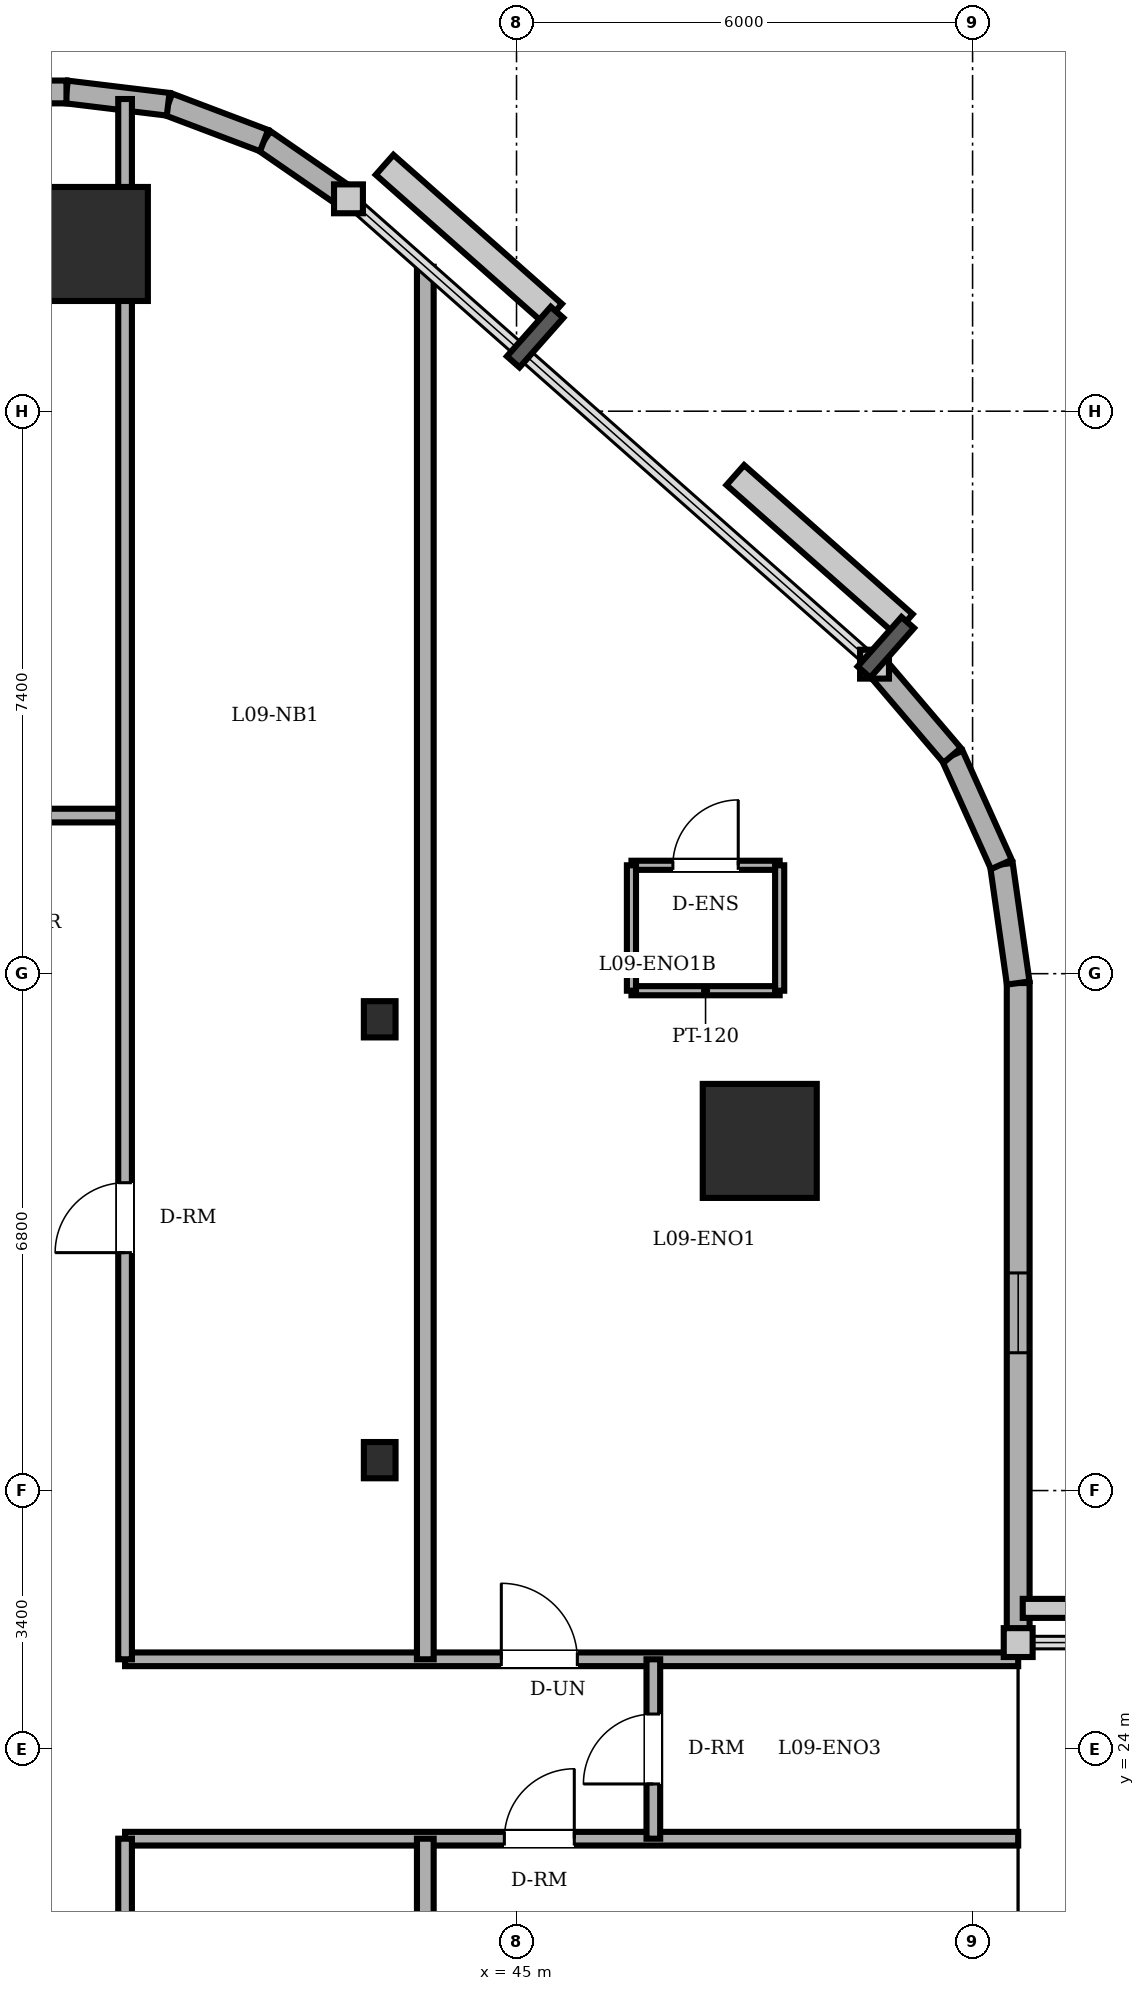
"""IFC4 building model, lengths in metres.
Left out: names, types, materials, properties, quantities, classifications, styles, units other than length and angle.
Written with IfcOpenShell. Run it as: python <this file> out.ifc"""

import sys

from ifc_helpers import new_model, si_unit, direction, frame, frame_2d, origin, origin_2d, place, context, subcontext, project, spatial, rectangle, circle, i_section, extrude, element, fill, save


model = new_model("IFC4")
c1 = context("Model", 3, precision=1e-05, world=origin(), true_north=direction((0.0, 1.0)))
c2 = subcontext(c1, "Body", "Model", "MODEL_VIEW")
j1 = project(units=[si_unit("LENGTHUNIT", "METRE"), si_unit("PLANEANGLEUNIT", "RADIAN")], contexts=[c1])
p1 = place(None, origin())
s1 = spatial("IfcSite", under=j1, at=p1, CompositionType="ELEMENT")
p2 = place(p1, origin())
s2 = spatial("IfcBuilding", under=s1, at=p2, CompositionType="ELEMENT")
p3 = place(p2, frame((0.0, 0.0, 36.0)))
s3 = spatial("IfcBuildingStorey", under=s2, at=p3, CompositionType="ELEMENT", Elevation=36.0)
for number, where, z_axis, x_axis in (
    (1, (48.2, 32.0, 0.0), (0.0, 0.0, 1.0), (1.0, 0.0, 0.0)),
    (2, (39.4, 43.8, 0.0), (0.0, 0.0, 1.0), (1.0, 0.0, 0.0)),
):
    element("IfcColumn", number, at=place(p3, frame(where, z_axis=z_axis, x_axis=x_axis)), inside=s3, PredefinedType="COLUMN", context=c2, shape_type="SweptSolid", body=[
        extrude(circle(Radius=0.75, at=origin_2d()), origin(), (0.0, 0.0, 1.0), 3.6),
    ])
for number, where, z_axis, x_axis in (
    (3, (43.2, 27.8, 0.0), (0.0, 0.0, 1.0), (1.0, 0.0, 0.0)),
    (4, (43.2, 33.6, 0.0), (0.0, 0.0, 1.0), (1.0, 0.0, 0.0)),
):
    element("IfcColumn", number, at=place(p3, frame(where, z_axis=z_axis, x_axis=x_axis)), inside=s3, PredefinedType="COLUMN", context=c2, shape_type="SweptSolid", body=[
        extrude(i_section(OverallWidth=0.417, OverallDepth=0.477, WebThickness=0.036, FlangeThickness=0.057, FilletRadius=0.015, at=origin_2d()), origin(), (0.0, 0.0, 1.0), 3.6),
    ])
p4 = place(p3, frame((51.6, 25.4, 0.0), z_axis=(0.0, 0.0, 1.0), x_axis=(0.0, 1.0, 0.0)))
e5 = element("IfcWall", 5, at=p4, inside=s3, PredefinedType="SOLIDWALL", context=c2, shape_type="SweptSolid", body=[
    extrude(rectangle(XDim=8.677, YDim=0.3, at=frame_2d((4.338, 0.0))), origin(), (0.0, 0.0, 1.0), 3.4),
])
p5 = place(p4, frame((3.813, 0.0, 0.85)))
e6 = element("IfcOpeningElement", 6, at=p5, cuts=e5, PredefinedType="OPENING", context=c2, shape_type="SweptSolid", body=[
    extrude(rectangle(XDim=1.05, YDim=1.55, at=frame_2d((0.525, 0.775))), frame((0.0, 0.16, 0.0), z_axis=(0.0, -1.0, 0.0), x_axis=(1.0, 0.0, 0.0)), (0.0, 0.0, 1.0), 0.32),
])
p6 = place(p3, frame((51.6, 34.077, 0.0), z_axis=(0.0, 0.0, 1.0), x_axis=(-0.140380048512, 0.990097693149, 0.0)))
e7 = element("IfcWall", 7, at=p6, inside=s3, PredefinedType="SOLIDWALL", context=c2, shape_type="SweptSolid", body=[
    extrude(rectangle(XDim=1.576, YDim=0.3, at=frame_2d((0.788, 0.0))), origin(), (0.0, 0.0, 1.0), 3.4),
])
p7 = place(p3, frame((51.379, 35.637, 0.0), z_axis=(0.0, 0.0, 1.0), x_axis=(-0.410996558744, 0.911636895206, 0.0)))
e8 = element("IfcWall", 8, at=p7, inside=s3, PredefinedType="SOLIDWALL", context=c2, shape_type="SweptSolid", body=[
    extrude(rectangle(XDim=1.574, YDim=0.3, at=frame_2d((0.787, 0.0))), origin(), (0.0, 0.0, 1.0), 3.4),
])
p8 = place(p3, frame((50.732, 37.072, 0.0), z_axis=(0.0, 0.0, 1.0), x_axis=(-0.648389989909, 0.7613083613, 0.0)))
e9 = element("IfcWall", 9, at=p8, inside=s3, PredefinedType="SOLIDWALL", context=c2, shape_type="SweptSolid", body=[
    extrude(rectangle(XDim=1.576, YDim=0.3, at=frame_2d((0.788, 0.0))), origin(), (0.0, 0.0, 1.0), 3.4),
])
p9 = place(p3, frame((42.789, 44.394, 0.0), z_axis=(0.0, 0.0, 1.0), x_axis=(-0.823116500192, 0.567872544777, 0.0)))
e10 = element("IfcWall", 10, at=p9, inside=s3, PredefinedType="SOLIDWALL", context=c2, shape_type="SweptSolid", body=[
    extrude(rectangle(XDim=1.349, YDim=0.3, at=frame_2d((0.674, 0.0))), origin(), (0.0, 0.0, 1.0), 3.4),
])
p10 = place(p3, frame((41.679, 45.16, 0.0), z_axis=(0.0, 0.0, 1.0), x_axis=(-0.935156721165, 0.354234254216, 0.0)))
e11 = element("IfcWall", 11, at=p10, inside=s3, PredefinedType="SOLIDWALL", context=c2, shape_type="SweptSolid", body=[
    extrude(rectangle(XDim=1.349, YDim=0.3, at=frame_2d((0.675, 0.0))), origin(), (0.0, 0.0, 1.0), 3.4),
])
p11 = place(p3, frame((40.417, 45.638, 0.0), z_axis=(0.0, 0.0, 1.0), x_axis=(-0.992739027259, 0.120288086515, 0.0)))
e12 = element("IfcWall", 12, at=p11, inside=s3, PredefinedType="SOLIDWALL", context=c2, shape_type="SweptSolid", body=[
    extrude(rectangle(XDim=1.348, YDim=0.3, at=frame_2d((0.674, 0.0))), origin(), (0.0, 0.0, 1.0), 3.4),
])
p12 = place(p3, frame((39.079, 45.8, 0.0), z_axis=(0.0, 0.0, 1.0), x_axis=(-1.0, 0.0, 0.0)))
e13 = element("IfcWall", 13, at=p12, inside=s3, PredefinedType="SOLIDWALL", context=c2, shape_type="SweptSolid", body=[
    extrude(rectangle(XDim=30.079, YDim=0.3, at=frame_2d((15.04, 0.0))), origin(), (0.0, 0.0, 1.0), 3.4),
])
p13 = place(p12, frame((16.504, 0.0, 0.0)))
e14 = element("IfcOpeningElement", 14, at=p13, cuts=e13, PredefinedType="OPENING", context=c2, shape_type="SweptSolid", body=[
    extrude(rectangle(XDim=0.95, YDim=2.2, at=frame_2d((0.475, 1.1))), frame((0.0, 0.16, 0.0), z_axis=(0.0, -1.0, 0.0), x_axis=(1.0, 0.0, 0.0)), (0.0, 0.0, 1.0), 0.32),
])
p14 = place(p12, frame((2.226, 0.0, 0.85)))
e15 = element("IfcOpeningElement", 15, at=p14, cuts=e13, PredefinedType="OPENING", context=c2, shape_type="SweptSolid", body=[
    extrude(rectangle(XDim=1.8, YDim=1.55, at=frame_2d((0.9, 0.775))), frame((0.0, 0.16, 0.0), z_axis=(0.0, -1.0, 0.0), x_axis=(1.0, 0.0, 0.0)), (0.0, 0.0, 1.0), 0.32),
])
p15 = place(p12, frame((5.003, 0.0, 0.85)))
e16 = element("IfcOpeningElement", 16, at=p15, cuts=e13, PredefinedType="OPENING", context=c2, shape_type="SweptSolid", body=[
    extrude(rectangle(XDim=1.8, YDim=1.55, at=frame_2d((0.9, 0.775))), frame((0.0, 0.16, 0.0), z_axis=(0.0, -1.0, 0.0), x_axis=(1.0, 0.0, 0.0)), (0.0, 0.0, 1.0), 0.32),
])
p16 = place(p12, frame((10.179, 0.0, 0.85)))
e17 = element("IfcOpeningElement", 17, at=p16, cuts=e13, PredefinedType="OPENING", context=c2, shape_type="SweptSolid", body=[
    extrude(rectangle(XDim=1.8, YDim=1.55, at=frame_2d((0.9, 0.775))), frame((0.0, 0.16, 0.0), z_axis=(0.0, -1.0, 0.0), x_axis=(1.0, 0.0, 0.0)), (0.0, 0.0, 1.0), 0.32),
])
p17 = place(p12, frame((12.579, 0.0, 0.85)))
e18 = element("IfcOpeningElement", 18, at=p17, cuts=e13, PredefinedType="OPENING", context=c2, shape_type="SweptSolid", body=[
    extrude(rectangle(XDim=1.8, YDim=1.55, at=frame_2d((0.9, 0.775))), frame((0.0, 0.16, 0.0), z_axis=(0.0, -1.0, 0.0), x_axis=(1.0, 0.0, 0.0)), (0.0, 0.0, 1.0), 0.32),
])
p18 = place(p12, frame((19.007, 0.0, 0.85)))
e19 = element("IfcOpeningElement", 19, at=p18, cuts=e13, PredefinedType="OPENING", context=c2, shape_type="SweptSolid", body=[
    extrude(rectangle(XDim=1.8, YDim=1.55, at=frame_2d((0.9, 0.775))), frame((0.0, 0.16, 0.0), z_axis=(0.0, -1.0, 0.0), x_axis=(1.0, 0.0, 0.0)), (0.0, 0.0, 1.0), 0.32),
])
p19 = place(p12, frame((23.034, 0.0, 0.85)))
e20 = element("IfcOpeningElement", 20, at=p19, cuts=e13, PredefinedType="OPENING", context=c2, shape_type="SweptSolid", body=[
    extrude(rectangle(XDim=1.8, YDim=1.55, at=frame_2d((0.9, 0.775))), frame((0.0, 0.16, 0.0), z_axis=(0.0, -1.0, 0.0), x_axis=(1.0, 0.0, 0.0)), (0.0, 0.0, 1.0), 0.32),
])
p20 = place(p3, frame((46.512, 35.626, 0.0), z_axis=(0.0, 0.0, 1.0), x_axis=(1.0, 0.0, 0.0)))
e21 = element("IfcWall", 21, at=p20, inside=s3, PredefinedType="PARTITIONING", context=c2, shape_type="SweptSolid", body=[
    extrude(rectangle(XDim=1.95, YDim=0.12, at=frame_2d((0.975, 0.0))), origin(), (0.0, 0.0, 1.0), 3.4),
])
p21 = place(p20, frame((0.545, 0.0, 0.0)))
e22 = element("IfcOpeningElement", 22, at=p21, cuts=e21, PredefinedType="OPENING", context=c2, shape_type="SweptSolid", body=[
    extrude(rectangle(XDim=0.86, YDim=2.1, at=frame_2d((0.43, 1.05))), frame((0.0, 0.07, 0.0), z_axis=(0.0, -1.0, 0.0), x_axis=(1.0, 0.0, 0.0)), (0.0, 0.0, 1.0), 0.14),
])
p22 = place(p3, frame((48.462, 33.976, 0.0), z_axis=(0.0, 0.0, 1.0), x_axis=(-1.0, 0.0, 0.0)))
e23 = element("IfcWall", 23, at=p22, inside=s3, PredefinedType="PARTITIONING", context=c2, shape_type="SweptSolid", body=[
    extrude(rectangle(XDim=1.95, YDim=0.12, at=frame_2d((0.975, 0.0))), origin(), (0.0, 0.0, 1.0), 3.4),
])
for number, where, z_axis, x_axis in (
    (24, (46.512, 35.626, 0.0), (0.0, 0.0, 1.0), (0.0, -1.0, 0.0)),
    (25, (48.462, 33.976, 0.0), (0.0, 0.0, 1.0), (0.0, 1.0, 0.0)),
):
    element("IfcWall", number, at=place(p3, frame(where, z_axis=z_axis, x_axis=x_axis)), inside=s3, PredefinedType="PARTITIONING", context=c2, shape_type="SweptSolid", body=[
        extrude(rectangle(XDim=1.65, YDim=0.12, at=frame_2d((0.825, 0.0))), origin(), (0.0, 0.0, 1.0), 3.4),
    ])
p23 = place(p3, frame((39.85, 22.82, 0.0), z_axis=(0.0, 0.0, 1.0), x_axis=(1.0, 0.0, 0.0)))
e26 = element("IfcWall", 26, at=p23, inside=s3, PredefinedType="PARTITIONING", context=c2, shape_type="SweptSolid", body=[
    extrude(rectangle(XDim=11.75, YDim=0.18, at=frame_2d((5.875, 0.0))), origin(), (0.0, 0.0, 1.0), 3.4),
])
p24 = place(p23, frame((4.99, 0.0, 0.0)))
e27 = element("IfcOpeningElement", 27, at=p24, cuts=e26, PredefinedType="OPENING", context=c2, shape_type="SweptSolid", body=[
    extrude(rectangle(XDim=0.92, YDim=2.1, at=frame_2d((0.46, 1.05))), frame((0.0, 0.1, 0.0), z_axis=(0.0, -1.0, 0.0), x_axis=(1.0, 0.0, 0.0)), (0.0, 0.0, 1.0), 0.2),
])
p25 = place(p3, frame((39.85, 25.18, 0.0), z_axis=(0.0, 0.0, 1.0), x_axis=(1.0, 0.0, 0.0)))
e28 = element("IfcWall", 28, at=p25, inside=s3, PredefinedType="PARTITIONING", context=c2, shape_type="SweptSolid", body=[
    extrude(rectangle(XDim=11.75, YDim=0.18, at=frame_2d((5.875, 0.0))), origin(), (0.0, 0.0, 1.0), 3.4),
])
p26 = place(p25, frame((4.95, 0.0, 0.0)))
e29 = element("IfcOpeningElement", 29, at=p26, cuts=e28, PredefinedType="OPENING", context=c2, shape_type="SweptSolid", body=[
    extrude(rectangle(XDim=1.0, YDim=2.15, at=frame_2d((0.5, 1.075))), frame((0.0, 0.1, 0.0), z_axis=(0.0, -1.0, 0.0), x_axis=(1.0, 0.0, 0.0)), (0.0, 0.0, 1.0), 0.2),
])
p27 = place(p3, frame((3.4, 36.28, 0.0), z_axis=(0.0, 0.0, 1.0), x_axis=(1.0, 0.0, 0.0)))
e30 = element("IfcWall", 30, at=p27, inside=s3, PredefinedType="PARTITIONING", context=c2, shape_type="SweptSolid", body=[
    extrude(rectangle(XDim=36.45, YDim=0.18, at=frame_2d((18.225, 0.0))), origin(), (0.0, 0.0, 1.0), 3.4),
])
p28 = place(p27, frame((21.05, 0.0, 0.0)))
e31 = element("IfcOpeningElement", 31, at=p28, cuts=e30, PredefinedType="OPENING", context=c2, shape_type="SweptSolid", body=[
    extrude(rectangle(XDim=0.9, YDim=2.1, at=frame_2d((0.45, 1.05))), frame((0.0, 0.1, 0.0), z_axis=(0.0, -1.0, 0.0), x_axis=(1.0, 0.0, 0.0)), (0.0, 0.0, 1.0), 0.2),
])
p29 = place(p27, frame((24.67, 0.0, 0.0)))
e32 = element("IfcOpeningElement", 32, at=p29, cuts=e30, PredefinedType="OPENING", context=c2, shape_type="SweptSolid", body=[
    extrude(rectangle(XDim=0.86, YDim=2.1, at=frame_2d((0.43, 1.05))), frame((0.0, 0.1, 0.0), z_axis=(0.0, -1.0, 0.0), x_axis=(1.0, 0.0, 0.0)), (0.0, 0.0, 1.0), 0.2),
])
p30 = place(p27, frame((4.659, 0.0, 0.0)))
e33 = element("IfcOpeningElement", 33, at=p30, cuts=e30, PredefinedType="OPENING", context=c2, shape_type="SweptSolid", body=[
    extrude(rectangle(XDim=1.0, YDim=2.15, at=frame_2d((0.5, 1.075))), frame((0.0, 0.1, 0.0), z_axis=(0.0, -1.0, 0.0), x_axis=(1.0, 0.0, 0.0)), (0.0, 0.0, 1.0), 0.2),
])
p31 = place(p27, frame((13.258, 0.0, 0.0)))
e34 = element("IfcOpeningElement", 34, at=p31, cuts=e30, PredefinedType="OPENING", context=c2, shape_type="SweptSolid", body=[
    extrude(rectangle(XDim=1.0, YDim=2.15, at=frame_2d((0.5, 1.075))), frame((0.0, 0.1, 0.0), z_axis=(0.0, -1.0, 0.0), x_axis=(1.0, 0.0, 0.0)), (0.0, 0.0, 1.0), 0.2),
])
p32 = place(p27, frame((30.965, 0.0, 0.0)))
e35 = element("IfcOpeningElement", 35, at=p32, cuts=e30, PredefinedType="OPENING", context=c2, shape_type="SweptSolid", body=[
    extrude(rectangle(XDim=1.0, YDim=2.15, at=frame_2d((0.5, 1.075))), frame((0.0, 0.1, 0.0), z_axis=(0.0, -1.0, 0.0), x_axis=(1.0, 0.0, 0.0)), (0.0, 0.0, 1.0), 0.2),
])
p33 = place(p3, frame((39.85, 2.293, 0.0), z_axis=(0.0, 0.0, 1.0), x_axis=(0.0, 1.0, 0.0)))
e36 = element("IfcWall", 36, at=p33, inside=s3, PredefinedType="PARTITIONING", context=c2, shape_type="SweptSolid", body=[
    extrude(rectangle(XDim=20.527, YDim=0.18, at=frame_2d((10.264, 0.0))), origin(), (0.0, 0.0, 1.0), 2.782),
])
p34 = place(p33, frame((14.257, 0.0, 0.0)))
e37 = element("IfcOpeningElement", 37, at=p34, cuts=e36, PredefinedType="OPENING", context=c2, shape_type="SweptSolid", body=[
    extrude(rectangle(XDim=0.92, YDim=2.1, at=frame_2d((0.46, 1.05))), frame((0.0, 0.1, 0.0), z_axis=(0.0, -1.0, 0.0), x_axis=(1.0, 0.0, 0.0)), (0.0, 0.0, 1.0), 0.2),
])
p35 = place(p3, frame((39.85, 25.18, 0.0), z_axis=(0.0, 0.0, 1.0), x_axis=(0.0, 1.0, 0.0)))
e38 = element("IfcWall", 38, at=p35, inside=s3, PredefinedType="PARTITIONING", context=c2, shape_type="SweptSolid", body=[
    extrude(rectangle(XDim=20.527, YDim=0.18, at=frame_2d((10.264, 0.0))), origin(), (0.0, 0.0, 1.0), 2.782),
])
p36 = place(p35, frame((5.35, 0.0, 0.0)))
e39 = element("IfcOpeningElement", 39, at=p36, cuts=e38, PredefinedType="OPENING", context=c2, shape_type="SweptSolid", body=[
    extrude(rectangle(XDim=0.92, YDim=2.1, at=frame_2d((0.46, 1.05))), frame((0.0, 0.1, 0.0), z_axis=(0.0, -1.0, 0.0), x_axis=(1.0, 0.0, 0.0)), (0.0, 0.0, 1.0), 0.2),
])
for number, where, z_axis, x_axis in (
    (40, (43.8, 4.5, 0.0), (0.0, 0.0, 1.0), (0.0, 1.0, 0.0)),
    (41, (43.8, 25.18, 0.0), (0.0, 0.0, 1.0), (0.0, 1.0, 0.0)),
):
    element("IfcWall", number, at=place(p3, frame(where, z_axis=z_axis, x_axis=x_axis)), inside=s3, PredefinedType="PARTITIONING", context=c2, shape_type="SweptSolid", body=[
        extrude(rectangle(XDim=18.32, YDim=0.22, at=frame_2d((9.16, 0.0))), origin(), (0.0, 0.0, 1.0), 3.4),
    ])
p37 = place(p3, frame((46.8, 22.82, 0.0), z_axis=(0.0, 0.0, 1.0), x_axis=(0.0, 1.0, 0.0)))
e42 = element("IfcWall", 42, at=p37, inside=s3, PredefinedType="PARTITIONING", context=c2, shape_type="SweptSolid", body=[
    extrude(rectangle(XDim=2.36, YDim=0.18, at=frame_2d((1.18, 0.0))), origin(), (0.0, 0.0, 1.0), 3.4),
])
p38 = place(p37, frame((0.72, 0.0, 0.0)))
e43 = element("IfcOpeningElement", 43, at=p38, cuts=e42, PredefinedType="OPENING", context=c2, shape_type="SweptSolid", body=[
    extrude(rectangle(XDim=0.92, YDim=2.1, at=frame_2d((0.46, 1.05))), frame((0.0, 0.1, 0.0), z_axis=(0.0, -1.0, 0.0), x_axis=(1.0, 0.0, 0.0)), (0.0, 0.0, 1.0), 0.2),
])
p39 = place(p5, origin())
e44 = element("IfcWindow", 44, at=p39, inside=s3, PartitioningType="SINGLE_PANEL", PredefinedType="WINDOW", context=c2, shape_type="SweptSolid", body=[
    extrude(rectangle(XDim=1.05, YDim=1.55, at=frame_2d((0.525, 0.775))), frame((0.0, 0.03, 0.0), z_axis=(0.0, -1.0, 0.0), x_axis=(1.0, 0.0, 0.0)), (0.0, 0.0, 1.0), 0.06),
])
fill(e6, e44)
p40 = place(p21, origin())
e45 = element("IfcDoor", 45, at=p40, inside=s3, OperationType="SINGLE_SWING_RIGHT", PredefinedType="DOOR", context=c2, shape_type="SweptSolid", body=[
    extrude(rectangle(XDim=0.86, YDim=2.1, at=frame_2d((0.43, 1.05))), frame((0.0, 0.025, 0.0), z_axis=(0.0, -1.0, 0.0), x_axis=(1.0, 0.0, 0.0)), (0.0, 0.0, 1.0), 0.05),
])
fill(e22, e45)
p41 = place(p36, origin())
e46 = element("IfcDoor", 46, at=p41, inside=s3, OperationType="SINGLE_SWING_LEFT", PredefinedType="DOOR", context=c2, shape_type="SweptSolid", body=[
    extrude(rectangle(XDim=0.92, YDim=2.1, at=frame_2d((0.46, 1.05))), frame((0.0, 0.025, 0.0), z_axis=(0.0, -1.0, 0.0), x_axis=(1.0, 0.0, 0.0)), (0.0, 0.0, 1.0), 0.05),
])
fill(e39, e46)
p42 = place(p26, origin())
e47 = element("IfcDoor", 47, at=p42, inside=s3, OperationType="SINGLE_SWING_LEFT", PredefinedType="DOOR", context=c2, shape_type="SweptSolid", body=[
    extrude(rectangle(XDim=1.0, YDim=2.15, at=frame_2d((0.5, 1.075))), frame((0.0, 0.025, 0.0), z_axis=(0.0, -1.0, 0.0), x_axis=(1.0, 0.0, 0.0)), (0.0, 0.0, 1.0), 0.05),
])
fill(e29, e47)
p43 = place(p24, origin())
e48 = element("IfcDoor", 48, at=p43, inside=s3, OperationType="SINGLE_SWING_RIGHT", PredefinedType="DOOR", context=c2, shape_type="SweptSolid", body=[
    extrude(rectangle(XDim=0.92, YDim=2.1, at=frame_2d((0.46, 1.05))), frame((0.0, 0.025, 0.0), z_axis=(0.0, -1.0, 0.0), x_axis=(1.0, 0.0, 0.0)), (0.0, 0.0, 1.0), 0.05),
])
fill(e27, e48)
p44 = place(p38, origin())
e49 = element("IfcDoor", 49, at=p44, inside=s3, OperationType="SINGLE_SWING_LEFT", PredefinedType="DOOR", context=c2, shape_type="SweptSolid", body=[
    extrude(rectangle(XDim=0.92, YDim=2.1, at=frame_2d((0.46, 1.05))), frame((0.0, 0.025, 0.0), z_axis=(0.0, -1.0, 0.0), x_axis=(1.0, 0.0, 0.0)), (0.0, 0.0, 1.0), 0.05),
])
fill(e43, e49)
save(model, sys.argv[1])
